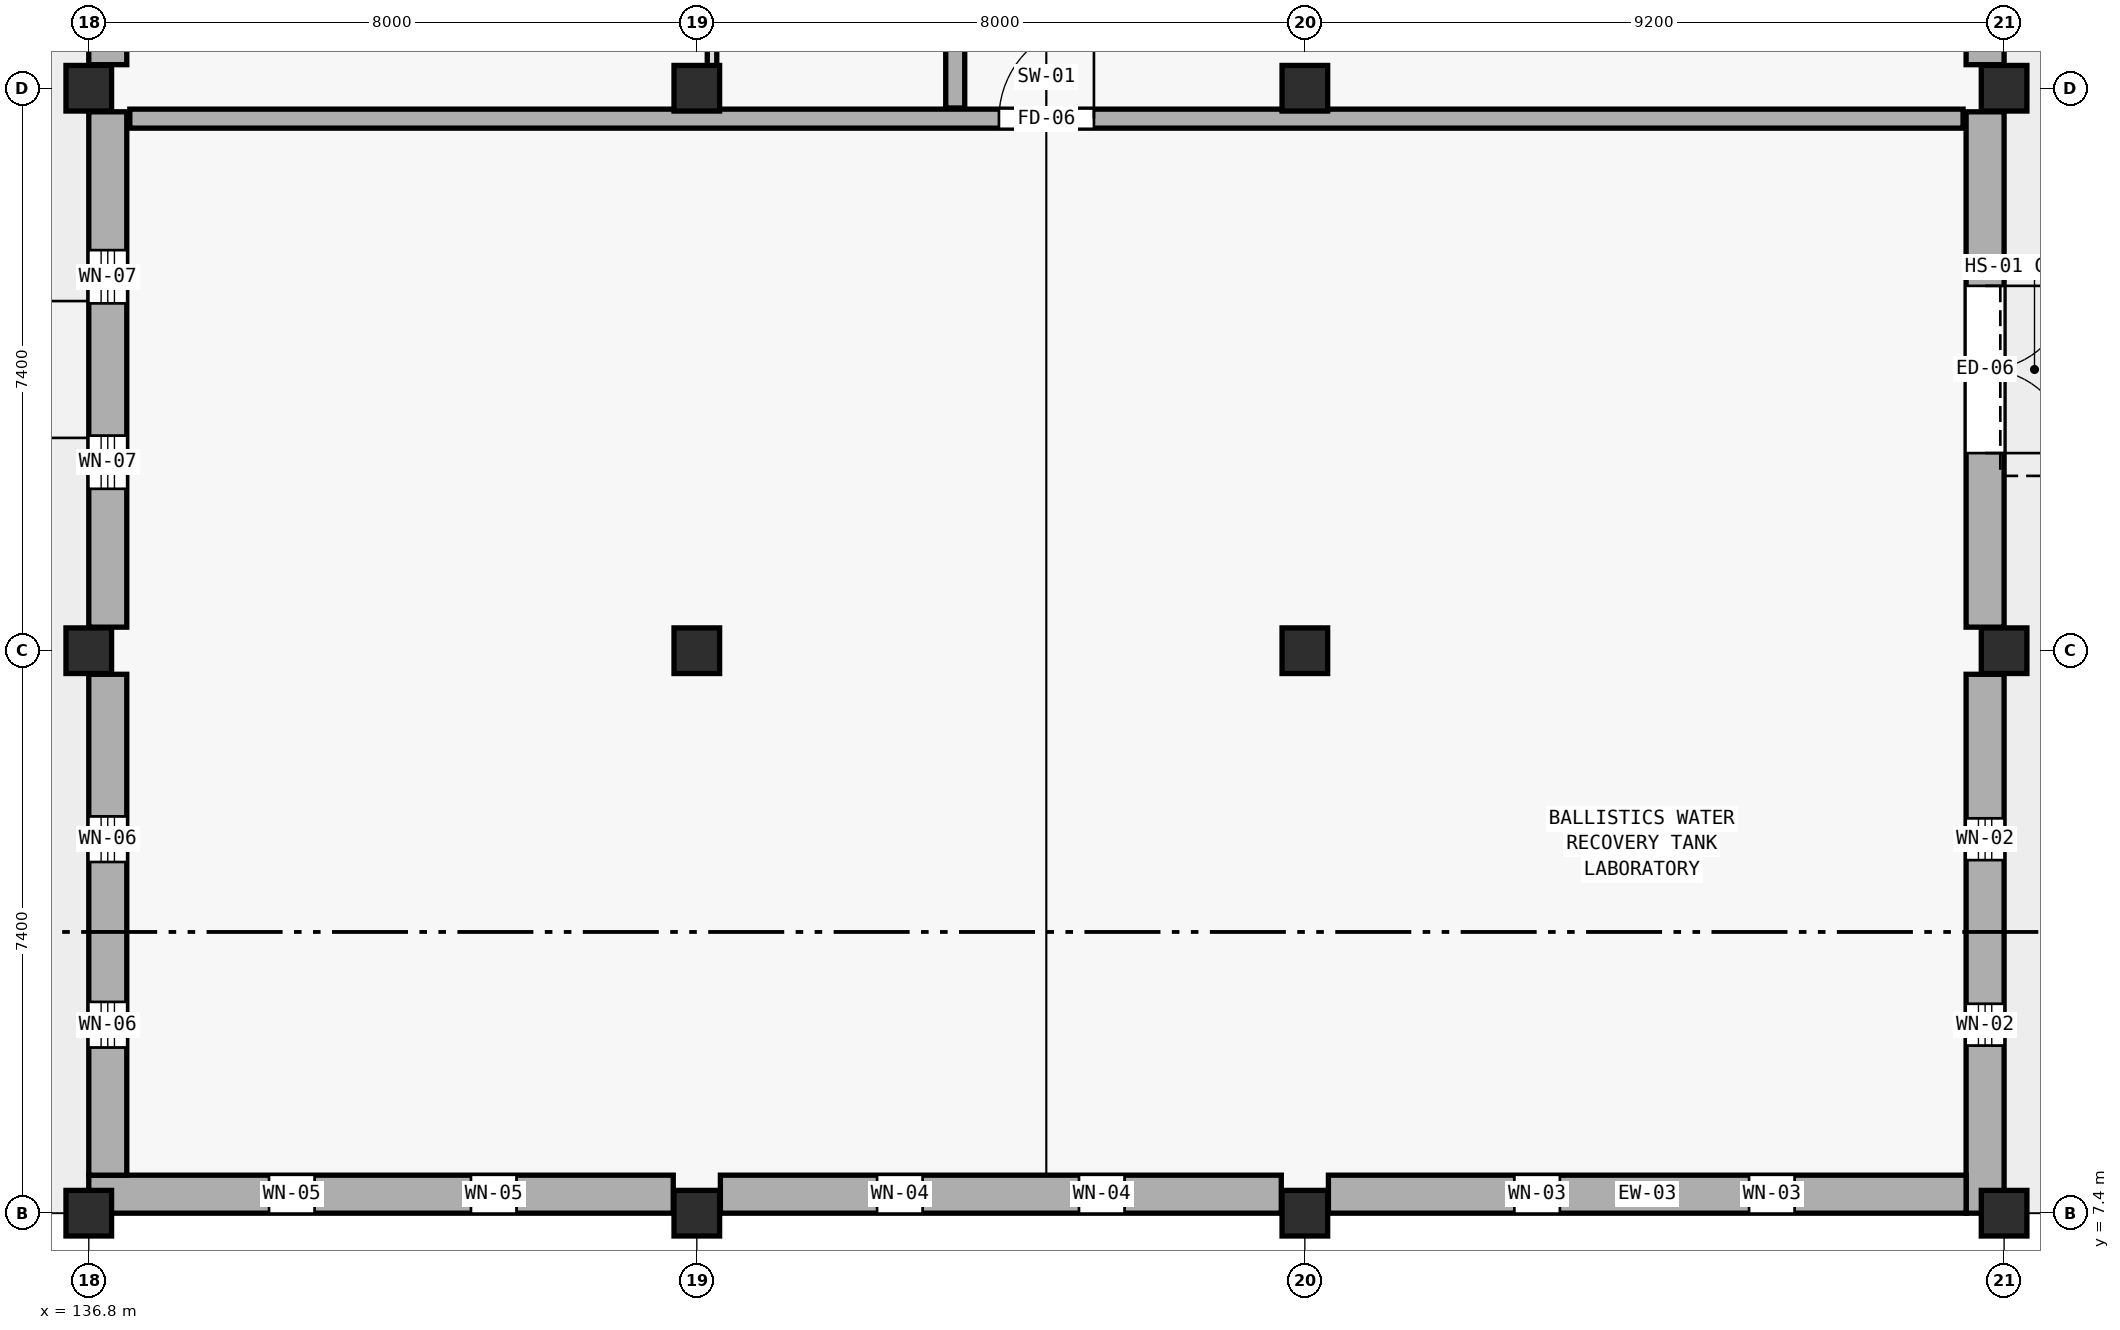
"""IFC4 building model, lengths in metres.
Left out: names, types, materials, properties, quantities, classifications, styles, units other than length and angle.
Written with IfcOpenShell. Run it as: python <this file> out.ifc"""

import sys

from ifc_helpers import new_model, si_unit, direction, frame, frame_2d, origin, origin_2d, place, context, subcontext, project, spatial, rectangle, extrude, element, fill, save


model = new_model("IFC4")
c1 = context("Model", 3, precision=1e-05, world=origin(), true_north=direction((0.0, 1.0)))
c2 = subcontext(c1, "Body", "Model", "MODEL_VIEW")
j1 = project(units=[si_unit("LENGTHUNIT", "METRE"), si_unit("PLANEANGLEUNIT", "RADIAN")], contexts=[c1])
p1 = place(None, origin())
s1 = spatial("IfcSite", under=j1, at=p1, CompositionType="ELEMENT")
p2 = place(p1, origin())
s2 = spatial("IfcBuilding", under=s1, at=p2, CompositionType="ELEMENT")
p3 = place(p2, origin())
s3 = spatial("IfcBuildingStorey", under=s2, at=p3, CompositionType="ELEMENT", Elevation=0.0)
for number, where, z_axis, x_axis in (
    (1, (136.8, 7.4, 0.0), (0.0, 0.0, 1.0), (1.0, 0.0, 0.0)),
    (2, (136.8, 14.8, 0.0), (0.0, 0.0, 1.0), (1.0, 0.0, 0.0)),
    (3, (136.8, 22.2, 0.0), (0.0, 0.0, 1.0), (1.0, 0.0, 0.0)),
    (4, (144.8, 7.4, 0.0), (0.0, 0.0, 1.0), (1.0, 0.0, 0.0)),
    (5, (144.8, 14.8, 0.0), (0.0, 0.0, 1.0), (1.0, 0.0, 0.0)),
    (6, (144.8, 22.2, 0.0), (0.0, 0.0, 1.0), (1.0, 0.0, 0.0)),
    (7, (152.8, 7.4, 0.0), (0.0, 0.0, 1.0), (1.0, 0.0, 0.0)),
    (8, (152.8, 14.8, 0.0), (0.0, 0.0, 1.0), (1.0, 0.0, 0.0)),
    (9, (152.8, 22.2, 0.0), (0.0, 0.0, 1.0), (1.0, 0.0, 0.0)),
    (10, (162.0, 7.4, 0.0), (0.0, 0.0, 1.0), (1.0, 0.0, 0.0)),
    (11, (162.0, 14.8, 0.0), (0.0, 0.0, 1.0), (1.0, 0.0, 0.0)),
    (12, (162.0, 22.2, 0.0), (0.0, 0.0, 1.0), (1.0, 0.0, 0.0)),
):
    element("IfcColumn", number, at=place(p3, frame(where, z_axis=z_axis, x_axis=x_axis)), inside=s3, PredefinedType="COLUMN", context=c2, shape_type="SweptSolid", body=[
        extrude(rectangle(XDim=0.6, YDim=0.6, at=origin_2d()), origin(), (0.0, 0.0, 1.0), 5.4),
    ])
p4 = place(p3, frame((161.75, 29.29, 0.0), z_axis=(0.0, 0.0, 1.0), x_axis=(0.0, -1.0, 0.0)))
e13 = element("IfcWall", 13, at=p4, inside=s3, PredefinedType="STANDARD", context=c2, shape_type="SweptSolid", body=[
    extrude(rectangle(XDim=6.78, YDim=0.5, at=frame_2d((3.39, 0.0))), origin(), (0.0, 0.0, 1.0), 5.155),
])
p5 = place(p4, frame((2.09, 0.0, 0.0)))
e14 = element("IfcOpeningElement", 14, at=p5, cuts=e13, PredefinedType="OPENING", context=c2, shape_type="SweptSolid", body=[
    extrude(rectangle(XDim=2.6, YDim=2.6, at=frame_2d((1.3, 1.3))), frame((0.0, 0.26, 0.0), z_axis=(0.0, -1.0, 0.0), x_axis=(1.0, 0.0, 0.0)), (0.0, 0.0, 1.0), 0.52),
])
p6 = place(p3, frame((161.75, 21.89, 0.0), z_axis=(0.0, 0.0, 1.0), x_axis=(0.0, -1.0, 0.0)))
e15 = element("IfcWall", 15, at=p6, inside=s3, PredefinedType="STANDARD", context=c2, shape_type="SweptSolid", body=[
    extrude(rectangle(XDim=6.78, YDim=0.5, at=frame_2d((3.39, 0.0))), origin(), (0.0, 0.0, 1.0), 5.155),
])
p7 = place(p6, frame((2.29, 0.0, 0.0)))
e16 = element("IfcOpeningElement", 16, at=p7, cuts=e15, PredefinedType="OPENING", context=c2, shape_type="SweptSolid", body=[
    extrude(rectangle(XDim=2.2, YDim=2.45, at=frame_2d((1.1, 1.225))), frame((0.0, 0.26, 0.0), z_axis=(0.0, -1.0, 0.0), x_axis=(1.0, 0.0, 0.0)), (0.0, 0.0, 1.0), 0.52),
])
p8 = place(p3, frame((161.75, 14.49, 0.0), z_axis=(0.0, 0.0, 1.0), x_axis=(0.0, -1.0, 0.0)))
e17 = element("IfcWall", 17, at=p8, inside=s3, PredefinedType="STANDARD", context=c2, shape_type="SweptSolid", body=[
    extrude(rectangle(XDim=7.09, YDim=0.5, at=frame_2d((3.545, 0.0))), origin(), (0.0, 0.0, 1.0), 5.155),
])
p9 = place(p8, frame((1.895, 0.0, 0.9)))
e18 = element("IfcOpeningElement", 18, at=p9, cuts=e17, PredefinedType="OPENING", context=c2, shape_type="SweptSolid", body=[
    extrude(rectangle(XDim=0.55, YDim=1.75, at=frame_2d((0.275, 0.875))), frame((0.0, 0.26, 0.0), z_axis=(0.0, -1.0, 0.0), x_axis=(1.0, 0.0, 0.0)), (0.0, 0.0, 1.0), 0.52),
])
p10 = place(p8, frame((4.335, 0.0, 0.9)))
e19 = element("IfcOpeningElement", 19, at=p10, cuts=e17, PredefinedType="OPENING", context=c2, shape_type="SweptSolid", body=[
    extrude(rectangle(XDim=0.55, YDim=1.75, at=frame_2d((0.275, 0.875))), frame((0.0, 0.26, 0.0), z_axis=(0.0, -1.0, 0.0), x_axis=(1.0, 0.0, 0.0)), (0.0, 0.0, 1.0), 0.52),
])
p11 = place(p3, frame((161.5, 7.65, 0.0), z_axis=(0.0, 0.0, 1.0), x_axis=(-1.0, 0.0, 0.0)))
e20 = element("IfcWall", 20, at=p11, inside=s3, PredefinedType="STANDARD", context=c2, shape_type="SweptSolid", body=[
    extrude(rectangle(XDim=8.39, YDim=0.5, at=frame_2d((4.195, 0.0))), origin(), (0.0, 0.0, 1.0), 5.155),
])
p12 = place(p11, frame((2.256, 0.0, 1.35)))
e21 = element("IfcOpeningElement", 21, at=p12, cuts=e20, PredefinedType="OPENING", context=c2, shape_type="SweptSolid", body=[
    extrude(rectangle(XDim=0.6, YDim=1.5, at=frame_2d((0.3, 0.75))), frame((0.0, 0.26, 0.0), z_axis=(0.0, -1.0, 0.0), x_axis=(1.0, 0.0, 0.0)), (0.0, 0.0, 1.0), 0.52),
])
p13 = place(p11, frame((5.344, 0.0, 1.35)))
e22 = element("IfcOpeningElement", 22, at=p13, cuts=e20, PredefinedType="OPENING", context=c2, shape_type="SweptSolid", body=[
    extrude(rectangle(XDim=0.6, YDim=1.5, at=frame_2d((0.3, 0.75))), frame((0.0, 0.26, 0.0), z_axis=(0.0, -1.0, 0.0), x_axis=(1.0, 0.0, 0.0)), (0.0, 0.0, 1.0), 0.52),
])
p14 = place(p3, frame((152.49, 7.65, 0.0), z_axis=(0.0, 0.0, 1.0), x_axis=(-1.0, 0.0, 0.0)))
e23 = element("IfcWall", 23, at=p14, inside=s3, PredefinedType="STANDARD", context=c2, shape_type="SweptSolid", body=[
    extrude(rectangle(XDim=7.38, YDim=0.5, at=frame_2d((3.69, 0.0))), origin(), (0.0, 0.0, 1.0), 5.155),
])
p15 = place(p14, frame((2.062, 0.0, 0.9)))
e24 = element("IfcOpeningElement", 24, at=p15, cuts=e23, PredefinedType="OPENING", context=c2, shape_type="SweptSolid", body=[
    extrude(rectangle(XDim=0.6, YDim=1.85, at=frame_2d((0.3, 0.925))), frame((0.0, 0.26, 0.0), z_axis=(0.0, -1.0, 0.0), x_axis=(1.0, 0.0, 0.0)), (0.0, 0.0, 1.0), 0.52),
])
p16 = place(p14, frame((4.719, 0.0, 0.9)))
e25 = element("IfcOpeningElement", 25, at=p16, cuts=e23, PredefinedType="OPENING", context=c2, shape_type="SweptSolid", body=[
    extrude(rectangle(XDim=0.6, YDim=1.85, at=frame_2d((0.3, 0.925))), frame((0.0, 0.26, 0.0), z_axis=(0.0, -1.0, 0.0), x_axis=(1.0, 0.0, 0.0)), (0.0, 0.0, 1.0), 0.52),
])
p17 = place(p3, frame((144.49, 7.65, 0.0), z_axis=(0.0, 0.0, 1.0), x_axis=(-1.0, 0.0, 0.0)))
e26 = element("IfcWall", 26, at=p17, inside=s3, PredefinedType="STANDARD", context=c2, shape_type="SweptSolid", body=[
    extrude(rectangle(XDim=7.69, YDim=0.5, at=frame_2d((3.845, 0.0))), origin(), (0.0, 0.0, 1.0), 5.155),
])
p18 = place(p17, frame((2.062, 0.0, 0.9)))
e27 = element("IfcOpeningElement", 27, at=p18, cuts=e26, PredefinedType="OPENING", context=c2, shape_type="SweptSolid", body=[
    extrude(rectangle(XDim=0.6, YDim=2.2, at=frame_2d((0.3, 1.1))), frame((0.0, 0.26, 0.0), z_axis=(0.0, -1.0, 0.0), x_axis=(1.0, 0.0, 0.0)), (0.0, 0.0, 1.0), 0.52),
])
p19 = place(p17, frame((4.719, 0.0, 0.9)))
e28 = element("IfcOpeningElement", 28, at=p19, cuts=e26, PredefinedType="OPENING", context=c2, shape_type="SweptSolid", body=[
    extrude(rectangle(XDim=0.6, YDim=2.2, at=frame_2d((0.3, 1.1))), frame((0.0, 0.26, 0.0), z_axis=(0.0, -1.0, 0.0), x_axis=(1.0, 0.0, 0.0)), (0.0, 0.0, 1.0), 0.52),
])
p20 = place(p3, frame((137.05, 7.9, 0.0), z_axis=(0.0, 0.0, 1.0), x_axis=(0.0, 1.0, 0.0)))
e29 = element("IfcWall", 29, at=p20, inside=s3, PredefinedType="STANDARD", context=c2, shape_type="SweptSolid", body=[
    extrude(rectangle(XDim=6.59, YDim=0.5, at=frame_2d((3.295, 0.0))), origin(), (0.0, 0.0, 1.0), 5.155),
])
p21 = place(p20, frame((1.68, 0.0, 0.9)))
e30 = element("IfcOpeningElement", 30, at=p21, cuts=e29, PredefinedType="OPENING", context=c2, shape_type="SweptSolid", body=[
    extrude(rectangle(XDim=0.6, YDim=2.6, at=frame_2d((0.3, 1.3))), frame((0.0, 0.26, 0.0), z_axis=(0.0, -1.0, 0.0), x_axis=(1.0, 0.0, 0.0)), (0.0, 0.0, 1.0), 0.52),
])
p22 = place(p20, frame((4.12, 0.0, 0.9)))
e31 = element("IfcOpeningElement", 31, at=p22, cuts=e29, PredefinedType="OPENING", context=c2, shape_type="SweptSolid", body=[
    extrude(rectangle(XDim=0.6, YDim=2.6, at=frame_2d((0.3, 1.3))), frame((0.0, 0.26, 0.0), z_axis=(0.0, -1.0, 0.0), x_axis=(1.0, 0.0, 0.0)), (0.0, 0.0, 1.0), 0.52),
])
p23 = place(p3, frame((137.05, 15.11, 0.0), z_axis=(0.0, 0.0, 1.0), x_axis=(0.0, 1.0, 0.0)))
e32 = element("IfcWall", 32, at=p23, inside=s3, PredefinedType="STANDARD", context=c2, shape_type="SweptSolid", body=[
    extrude(rectangle(XDim=6.78, YDim=0.5, at=frame_2d((3.39, 0.0))), origin(), (0.0, 0.0, 1.0), 5.155),
])
p24 = place(p23, frame((1.82, 0.0, 1.35)))
e33 = element("IfcOpeningElement", 33, at=p24, cuts=e32, PredefinedType="OPENING", context=c2, shape_type="SweptSolid", body=[
    extrude(rectangle(XDim=0.7, YDim=1.6, at=frame_2d((0.35, 0.8))), frame((0.0, 0.26, 0.0), z_axis=(0.0, -1.0, 0.0), x_axis=(1.0, 0.0, 0.0)), (0.0, 0.0, 1.0), 0.52),
])
p25 = place(p23, frame((4.26, 0.0, 1.35)))
e34 = element("IfcOpeningElement", 34, at=p25, cuts=e32, PredefinedType="OPENING", context=c2, shape_type="SweptSolid", body=[
    extrude(rectangle(XDim=0.7, YDim=1.6, at=frame_2d((0.35, 0.8))), frame((0.0, 0.26, 0.0), z_axis=(0.0, -1.0, 0.0), x_axis=(1.0, 0.0, 0.0)), (0.0, 0.0, 1.0), 0.52),
])
p26 = place(p3, frame((137.05, 22.51, 0.0), z_axis=(0.0, 0.0, 1.0), x_axis=(0.0, 1.0, 0.0)))
e35 = element("IfcWall", 35, at=p26, inside=s3, PredefinedType="STANDARD", context=c2, shape_type="SweptSolid", body=[
    extrude(rectangle(XDim=6.78, YDim=0.5, at=frame_2d((3.39, 0.0))), origin(), (0.0, 0.0, 1.0), 5.155),
])
p27 = place(p26, frame((1.82, 0.0, 0.9)))
e36 = element("IfcOpeningElement", 36, at=p27, cuts=e35, PredefinedType="OPENING", context=c2, shape_type="SweptSolid", body=[
    extrude(rectangle(XDim=0.7, YDim=2.0, at=frame_2d((0.35, 1.0))), frame((0.0, 0.26, 0.0), z_axis=(0.0, -1.0, 0.0), x_axis=(1.0, 0.0, 0.0)), (0.0, 0.0, 1.0), 0.52),
])
p28 = place(p26, frame((4.26, 0.0, 0.9)))
e37 = element("IfcOpeningElement", 37, at=p28, cuts=e35, PredefinedType="OPENING", context=c2, shape_type="SweptSolid", body=[
    extrude(rectangle(XDim=0.7, YDim=2.0, at=frame_2d((0.35, 1.0))), frame((0.0, 0.26, 0.0), z_axis=(0.0, -1.0, 0.0), x_axis=(1.0, 0.0, 0.0)), (0.0, 0.0, 1.0), 0.52),
])
p29 = place(p3, frame((137.34, 21.8, 0.0), z_axis=(0.0, 0.0, 1.0), x_axis=(1.0, 0.0, 0.0)))
e38 = element("IfcWall", 38, at=p29, inside=s3, PredefinedType="SOLIDWALL", context=c2, shape_type="SweptSolid", body=[
    extrude(rectangle(XDim=24.12, YDim=0.25, at=frame_2d((12.06, 0.0))), origin(), (0.0, 0.0, 1.0), 4.285),
])
p30 = place(p29, frame((11.435, 0.0, 0.0)))
e39 = element("IfcOpeningElement", 39, at=p30, cuts=e38, PredefinedType="OPENING", context=c2, shape_type="SweptSolid", body=[
    extrude(rectangle(XDim=1.25, YDim=2.3, at=frame_2d((0.625, 1.15))), frame((0.0, 0.135, 0.0), z_axis=(0.0, -1.0, 0.0), x_axis=(1.0, 0.0, 0.0)), (0.0, 0.0, 1.0), 0.27),
])
p31 = place(p3, frame((145.0, 22.39, 0.0), z_axis=(0.0, 0.0, 1.0), x_axis=(0.0, 1.0, 0.0)))
e40 = element("IfcWall", 40, at=p31, inside=s3, PredefinedType="PARTITIONING", context=c2, shape_type="SweptSolid", body=[
    extrude(rectangle(XDim=21.42, YDim=0.125, at=frame_2d((10.71, 0.0))), origin(), (0.0, 0.0, 1.0), 4.285),
])
p32 = place(p31, frame((10.11, 0.0, 0.0)))
e41 = element("IfcOpeningElement", 41, at=p32, cuts=e40, PredefinedType="OPENING", context=c2, shape_type="SweptSolid", body=[
    extrude(rectangle(XDim=1.2, YDim=2.2, at=frame_2d((0.6, 1.1))), frame((0.0, 0.073, 0.0), z_axis=(0.0, -1.0, 0.0), x_axis=(1.0, 0.0, 0.0)), (0.0, 0.0, 1.0), 0.145),
])
p33 = place(p3, frame((148.2, 21.94, 0.0), z_axis=(0.0, 0.0, 1.0), x_axis=(0.0, 1.0, 0.0)))
e42 = element("IfcWall", 42, at=p33, inside=s3, PredefinedType="SOLIDWALL", context=c2, shape_type="SweptSolid", body=[
    extrude(rectangle(XDim=22.46, YDim=0.25, at=frame_2d((11.23, 0.0))), origin(), (0.0, 0.0, 1.0), 4.285),
])
p34 = place(p33, frame((10.435, 0.0, 0.0)))
e43 = element("IfcOpeningElement", 43, at=p34, cuts=e42, PredefinedType="OPENING", context=c2, shape_type="SweptSolid", body=[
    extrude(rectangle(XDim=1.45, YDim=2.3, at=frame_2d((0.725, 1.15))), frame((0.0, 0.135, 0.0), z_axis=(0.0, -1.0, 0.0), x_axis=(1.0, 0.0, 0.0)), (0.0, 0.0, 1.0), 0.27),
])
p35 = place(p7, origin())
e44 = element("IfcDoor", 44, at=p35, inside=s3, OperationType="DOUBLE_DOOR_SINGLE_SWING", PredefinedType="DOOR", context=c2, shape_type="SweptSolid", body=[
    extrude(rectangle(XDim=2.2, YDim=2.45, at=frame_2d((1.1, 1.225))), frame((0.0, 0.025, 0.0), z_axis=(0.0, -1.0, 0.0), x_axis=(1.0, 0.0, 0.0)), (0.0, 0.0, 1.0), 0.05),
])
fill(e16, e44)
p36 = place(p9, origin())
e45 = element("IfcWindow", 45, at=p36, inside=s3, PartitioningType="SINGLE_PANEL", PredefinedType="WINDOW", context=c2, shape_type="SweptSolid", body=[
    extrude(rectangle(XDim=0.55, YDim=1.75, at=frame_2d((0.275, 0.875))), frame((0.0, 0.03, 0.0), z_axis=(0.0, -1.0, 0.0), x_axis=(1.0, 0.0, 0.0)), (0.0, 0.0, 1.0), 0.06),
])
fill(e18, e45)
p37 = place(p10, origin())
e46 = element("IfcWindow", 46, at=p37, inside=s3, PartitioningType="SINGLE_PANEL", PredefinedType="WINDOW", context=c2, shape_type="SweptSolid", body=[
    extrude(rectangle(XDim=0.55, YDim=1.75, at=frame_2d((0.275, 0.875))), frame((0.0, 0.03, 0.0), z_axis=(0.0, -1.0, 0.0), x_axis=(1.0, 0.0, 0.0)), (0.0, 0.0, 1.0), 0.06),
])
fill(e19, e46)
p38 = place(p12, origin())
e47 = element("IfcWindow", 47, at=p38, inside=s3, PartitioningType="SINGLE_PANEL", PredefinedType="WINDOW", context=c2, shape_type="SweptSolid", body=[
    extrude(rectangle(XDim=0.6, YDim=1.5, at=frame_2d((0.3, 0.75))), frame((0.0, 0.03, 0.0), z_axis=(0.0, -1.0, 0.0), x_axis=(1.0, 0.0, 0.0)), (0.0, 0.0, 1.0), 0.06),
])
fill(e21, e47)
p39 = place(p13, origin())
e48 = element("IfcWindow", 48, at=p39, inside=s3, PartitioningType="SINGLE_PANEL", PredefinedType="WINDOW", context=c2, shape_type="SweptSolid", body=[
    extrude(rectangle(XDim=0.6, YDim=1.5, at=frame_2d((0.3, 0.75))), frame((0.0, 0.03, 0.0), z_axis=(0.0, -1.0, 0.0), x_axis=(1.0, 0.0, 0.0)), (0.0, 0.0, 1.0), 0.06),
])
fill(e22, e48)
p40 = place(p15, origin())
e49 = element("IfcWindow", 49, at=p40, inside=s3, PartitioningType="SINGLE_PANEL", PredefinedType="WINDOW", context=c2, shape_type="SweptSolid", body=[
    extrude(rectangle(XDim=0.6, YDim=1.85, at=frame_2d((0.3, 0.925))), frame((0.0, 0.03, 0.0), z_axis=(0.0, -1.0, 0.0), x_axis=(1.0, 0.0, 0.0)), (0.0, 0.0, 1.0), 0.06),
])
fill(e24, e49)
p41 = place(p16, origin())
e50 = element("IfcWindow", 50, at=p41, inside=s3, PartitioningType="SINGLE_PANEL", PredefinedType="WINDOW", context=c2, shape_type="SweptSolid", body=[
    extrude(rectangle(XDim=0.6, YDim=1.85, at=frame_2d((0.3, 0.925))), frame((0.0, 0.03, 0.0), z_axis=(0.0, -1.0, 0.0), x_axis=(1.0, 0.0, 0.0)), (0.0, 0.0, 1.0), 0.06),
])
fill(e25, e50)
p42 = place(p18, origin())
e51 = element("IfcWindow", 51, at=p42, inside=s3, PartitioningType="SINGLE_PANEL", PredefinedType="WINDOW", context=c2, shape_type="SweptSolid", body=[
    extrude(rectangle(XDim=0.6, YDim=2.2, at=frame_2d((0.3, 1.1))), frame((0.0, 0.03, 0.0), z_axis=(0.0, -1.0, 0.0), x_axis=(1.0, 0.0, 0.0)), (0.0, 0.0, 1.0), 0.06),
])
fill(e27, e51)
p43 = place(p19, origin())
e52 = element("IfcWindow", 52, at=p43, inside=s3, PartitioningType="SINGLE_PANEL", PredefinedType="WINDOW", context=c2, shape_type="SweptSolid", body=[
    extrude(rectangle(XDim=0.6, YDim=2.2, at=frame_2d((0.3, 1.1))), frame((0.0, 0.03, 0.0), z_axis=(0.0, -1.0, 0.0), x_axis=(1.0, 0.0, 0.0)), (0.0, 0.0, 1.0), 0.06),
])
fill(e28, e52)
p44 = place(p21, origin())
e53 = element("IfcWindow", 53, at=p44, inside=s3, PartitioningType="SINGLE_PANEL", PredefinedType="WINDOW", context=c2, shape_type="SweptSolid", body=[
    extrude(rectangle(XDim=0.6, YDim=2.6, at=frame_2d((0.3, 1.3))), frame((0.0, 0.03, 0.0), z_axis=(0.0, -1.0, 0.0), x_axis=(1.0, 0.0, 0.0)), (0.0, 0.0, 1.0), 0.06),
])
fill(e30, e53)
p45 = place(p22, origin())
e54 = element("IfcWindow", 54, at=p45, inside=s3, PartitioningType="SINGLE_PANEL", PredefinedType="WINDOW", context=c2, shape_type="SweptSolid", body=[
    extrude(rectangle(XDim=0.6, YDim=2.6, at=frame_2d((0.3, 1.3))), frame((0.0, 0.03, 0.0), z_axis=(0.0, -1.0, 0.0), x_axis=(1.0, 0.0, 0.0)), (0.0, 0.0, 1.0), 0.06),
])
fill(e31, e54)
p46 = place(p24, origin())
e55 = element("IfcWindow", 55, at=p46, inside=s3, PartitioningType="SINGLE_PANEL", PredefinedType="WINDOW", context=c2, shape_type="SweptSolid", body=[
    extrude(rectangle(XDim=0.7, YDim=1.6, at=frame_2d((0.35, 0.8))), frame((0.0, 0.03, 0.0), z_axis=(0.0, -1.0, 0.0), x_axis=(1.0, 0.0, 0.0)), (0.0, 0.0, 1.0), 0.06),
])
fill(e33, e55)
p47 = place(p25, origin())
e56 = element("IfcWindow", 56, at=p47, inside=s3, PartitioningType="SINGLE_PANEL", PredefinedType="WINDOW", context=c2, shape_type="SweptSolid", body=[
    extrude(rectangle(XDim=0.7, YDim=1.6, at=frame_2d((0.35, 0.8))), frame((0.0, 0.03, 0.0), z_axis=(0.0, -1.0, 0.0), x_axis=(1.0, 0.0, 0.0)), (0.0, 0.0, 1.0), 0.06),
])
fill(e34, e56)
p48 = place(p30, origin())
e57 = element("IfcDoor", 57, at=p48, inside=s3, OperationType="SINGLE_SWING_RIGHT", PredefinedType="DOOR", context=c2, shape_type="SweptSolid", body=[
    extrude(rectangle(XDim=1.25, YDim=2.3, at=frame_2d((0.625, 1.15))), frame((0.0, 0.025, 0.0), z_axis=(0.0, -1.0, 0.0), x_axis=(1.0, 0.0, 0.0)), (0.0, 0.0, 1.0), 0.05),
])
fill(e39, e57)
save(model, sys.argv[1])
